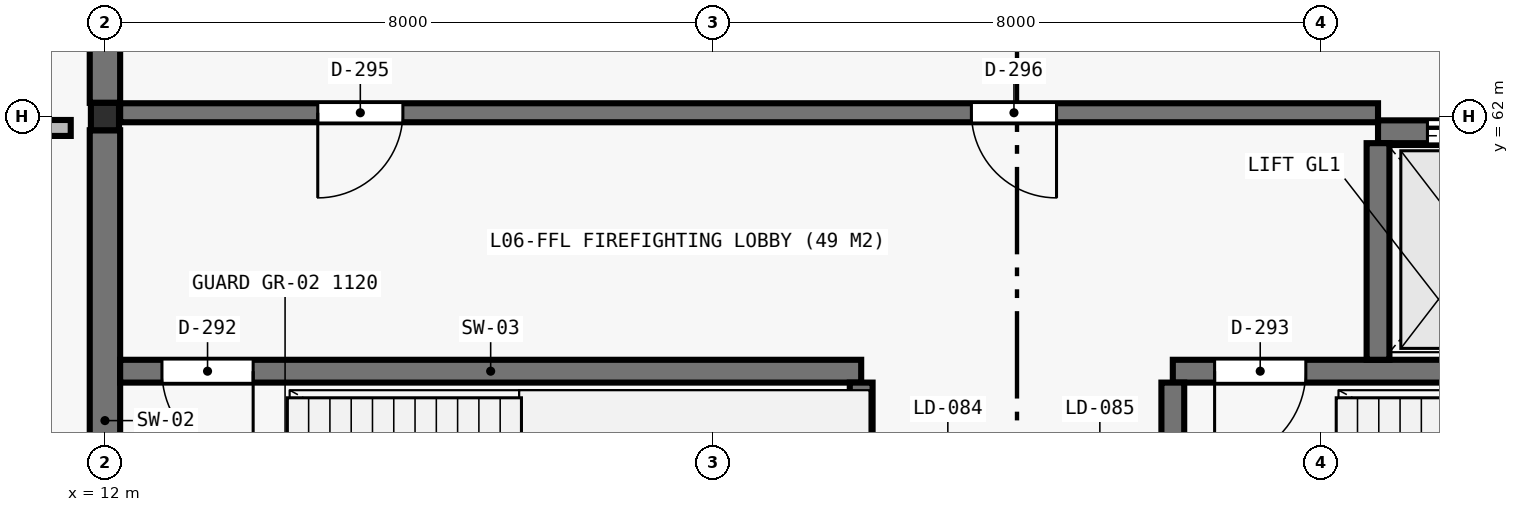
"""IFC4 building model, lengths in metres.
Left out: names, types, materials, properties, quantities, classifications, styles, units other than length and angle.
Written with IfcOpenShell. Run it as: python <this file> out.ifc"""

import sys

from ifc_helpers import new_model, si_unit, direction, frame, frame_2d, origin, origin_2d, place, context, subcontext, project, spatial, rectangle, i_section, extrude, element, fill, save


model = new_model("IFC4")
c1 = context("Model", 3, precision=1e-05, world=origin(), true_north=direction((0.0, 1.0)))
c2 = subcontext(c1, "Body", "Model", "MODEL_VIEW")
j1 = project(units=[si_unit("LENGTHUNIT", "METRE"), si_unit("PLANEANGLEUNIT", "RADIAN")], contexts=[c1])
p1 = place(None, origin())
s1 = spatial("IfcSite", under=j1, at=p1, CompositionType="ELEMENT")
p2 = place(p1, origin())
s2 = spatial("IfcBuilding", under=s1, at=p2, CompositionType="ELEMENT")
p3 = place(p2, frame((0.0, 0.0, 28.0)))
s3 = spatial("IfcBuildingStorey", under=s2, at=p3, CompositionType="ELEMENT", Elevation=28.0)
p4 = place(p3, frame((12.0, 62.0, 0.0), z_axis=(0.0, 0.0, 1.0), x_axis=(1.0, 0.0, 0.0)))
e1 = element("IfcColumn", 1, at=p4, inside=s3, PredefinedType="COLUMN", context=c2, shape_type="SweptSolid", body=[
    extrude(i_section(OverallWidth=0.37, OverallDepth=0.36, WebThickness=0.012, FlangeThickness=0.02, at=origin_2d()), origin(), (0.0, 0.0, 1.0), 3.98),
])
p5 = place(p3, frame((12.0, 54.18, 0.0), z_axis=(0.0, 0.0, 1.0), x_axis=(0.0, 1.0, 0.0)))
e2 = element("IfcWall", 2, at=p5, inside=s3, PredefinedType="SHEAR", context=c2, shape_type="SweptSolid", body=[
    extrude(rectangle(XDim=7.64, YDim=0.4, at=frame_2d((3.82, 0.0))), origin(), (0.0, 0.0, 1.0), 3.98),
])
p6 = place(p3, frame((12.0, 62.18, 0.0), z_axis=(0.0, 0.0, 1.0), x_axis=(0.0, 1.0, 0.0)))
e3 = element("IfcWall", 3, at=p6, inside=s3, PredefinedType="SHEAR", context=c2, shape_type="SweptSolid", body=[
    extrude(rectangle(XDim=7.64, YDim=0.4, at=frame_2d((3.82, 0.0))), origin(), (0.0, 0.0, 1.0), 3.98),
])
p7 = place(p6, frame((0.72, 0.0, 0.0)))
e4 = element("IfcOpeningElement", 4, at=p7, cuts=e3, PredefinedType="OPENING", context=c2, shape_type="SweptSolid", body=[
    extrude(rectangle(XDim=1.8, YDim=2.2, at=frame_2d((0.9, 1.1))), frame((0.0, 0.21, 0.0), z_axis=(0.0, -1.0, 0.0), x_axis=(1.0, 0.0, 0.0)), (0.0, 0.0, 1.0), 0.42),
])
p8 = place(p3, frame((12.2, 58.65, 0.0), z_axis=(0.0, 0.0, 1.0), x_axis=(1.0, 0.0, 0.0)))
e5 = element("IfcWall", 5, at=p8, inside=s3, PredefinedType="SHEAR", context=c2, shape_type="SweptSolid", body=[
    extrude(rectangle(XDim=9.75, YDim=0.3, at=frame_2d((4.875, 0.0))), origin(), (0.0, 0.0, 1.0), 3.98),
])
p9 = place(p8, frame((0.55, 0.0, 0.0)))
e6 = element("IfcOpeningElement", 6, at=p9, cuts=e5, PredefinedType="OPENING", context=c2, shape_type="SweptSolid", body=[
    extrude(rectangle(XDim=1.2, YDim=2.2, at=frame_2d((0.6, 1.1))), frame((0.0, 0.16, 0.0), z_axis=(0.0, -1.0, 0.0), x_axis=(1.0, 0.0, 0.0)), (0.0, 0.0, 1.0), 0.32),
])
p10 = place(p3, frame((21.95, 54.25, 0.0), z_axis=(0.0, 0.0, 1.0), x_axis=(0.0, 1.0, 0.0)))
e7 = element("IfcWall", 7, at=p10, inside=s3, PredefinedType="SHEAR", context=c2, shape_type="SweptSolid", body=[
    extrude(rectangle(XDim=4.25, YDim=0.3, at=frame_2d((2.125, 0.0))), origin(), (0.0, 0.0, 1.0), 3.98),
])
p11 = place(p3, frame((26.05, 58.65, 0.0), z_axis=(0.0, 0.0, 1.0), x_axis=(1.0, 0.0, 0.0)))
e8 = element("IfcWall", 8, at=p11, inside=s3, PredefinedType="SHEAR", context=c2, shape_type="SweptSolid", body=[
    extrude(rectangle(XDim=9.75, YDim=0.3, at=frame_2d((4.875, 0.0))), origin(), (0.0, 0.0, 1.0), 3.98),
])
p12 = place(p11, frame((0.55, 0.0, 0.0)))
e9 = element("IfcOpeningElement", 9, at=p12, cuts=e8, PredefinedType="OPENING", context=c2, shape_type="SweptSolid", body=[
    extrude(rectangle(XDim=1.2, YDim=2.2, at=frame_2d((0.6, 1.1))), frame((0.0, 0.16, 0.0), z_axis=(0.0, -1.0, 0.0), x_axis=(1.0, 0.0, 0.0)), (0.0, 0.0, 1.0), 0.32),
])
p13 = place(p3, frame((26.05, 54.25, 0.0), z_axis=(0.0, 0.0, 1.0), x_axis=(0.0, 1.0, 0.0)))
e10 = element("IfcWall", 10, at=p13, inside=s3, PredefinedType="SHEAR", context=c2, shape_type="SweptSolid", body=[
    extrude(rectangle(XDim=4.25, YDim=0.3, at=frame_2d((2.125, 0.0))), origin(), (0.0, 0.0, 1.0), 3.98),
])
p14 = place(p3, frame((28.75, 61.8, 0.0), z_axis=(0.0, 0.0, 1.0), x_axis=(1.0, 0.0, 0.0)))
e11 = element("IfcWall", 11, at=p14, inside=s3, PredefinedType="SHEAR", context=c2, shape_type="SweptSolid", body=[
    extrude(rectangle(XDim=5.0, YDim=0.3, at=frame_2d((2.5, 0.0))), origin(), (0.0, 0.0, 1.0), 3.98),
])
p15 = place(p14, frame((0.65, 0.0, 0.0)))
e12 = element("IfcOpeningElement", 12, at=p15, cuts=e11, PredefinedType="OPENING", context=c2, shape_type="SweptSolid", body=[
    extrude(rectangle(XDim=1.3, YDim=2.3, at=frame_2d((0.65, 1.15))), frame((0.0, 0.16, 0.0), z_axis=(0.0, -1.0, 0.0), x_axis=(1.0, 0.0, 0.0)), (0.0, 0.0, 1.0), 0.32),
])
p16 = place(p14, frame((3.1, 0.0, 0.0)))
e13 = element("IfcOpeningElement", 13, at=p16, cuts=e11, PredefinedType="OPENING", context=c2, shape_type="SweptSolid", body=[
    extrude(rectangle(XDim=1.08, YDim=2.2, at=frame_2d((0.54, 1.1))), frame((0.0, 0.16, 0.0), z_axis=(0.0, -1.0, 0.0), x_axis=(1.0, 0.0, 0.0)), (0.0, 0.0, 1.0), 0.32),
])
p17 = place(p3, frame((28.75, 58.8, 0.0), z_axis=(0.0, 0.0, 1.0), x_axis=(0.0, 1.0, 0.0)))
e14 = element("IfcWall", 14, at=p17, inside=s3, PredefinedType="SHEAR", context=c2, shape_type="SweptSolid", body=[
    extrude(rectangle(XDim=2.85, YDim=0.3, at=frame_2d((1.425, 0.0))), origin(), (0.0, 0.0, 1.0), 3.98),
])
p18 = place(p3, frame((12.2, 62.05, 0.0), z_axis=(0.0, 0.0, 1.0), x_axis=(1.0, 0.0, 0.0)))
e15 = element("IfcWall", 15, at=p18, inside=s3, PredefinedType="SHEAR", context=c2, shape_type="SweptSolid", body=[
    extrude(rectangle(XDim=16.55, YDim=0.25, at=frame_2d((8.275, 0.0))), origin(), (0.0, 0.0, 1.0), 3.98),
])
p19 = place(p18, frame((2.6, 0.0, 0.0)))
e16 = element("IfcOpeningElement", 16, at=p19, cuts=e15, PredefinedType="OPENING", context=c2, shape_type="SweptSolid", body=[
    extrude(rectangle(XDim=1.12, YDim=2.22, at=frame_2d((0.56, 1.11))), frame((0.0, 0.135, 0.0), z_axis=(0.0, -1.0, 0.0), x_axis=(1.0, 0.0, 0.0)), (0.0, 0.0, 1.0), 0.27),
])
p20 = place(p18, frame((11.2, 0.0, 0.0)))
e17 = element("IfcOpeningElement", 17, at=p20, cuts=e15, PredefinedType="OPENING", context=c2, shape_type="SweptSolid", body=[
    extrude(rectangle(XDim=1.12, YDim=2.22, at=frame_2d((0.56, 1.11))), frame((0.0, 0.135, 0.0), z_axis=(0.0, -1.0, 0.0), x_axis=(1.0, 0.0, 0.0)), (0.0, 0.0, 1.0), 0.27),
])
p21 = place(p3, frame((6.35, 61.85, 0.0), z_axis=(0.0, 0.0, 1.0), x_axis=(1.0, 0.0, 0.0)))
e18 = element("IfcWall", 18, at=p21, inside=s3, PredefinedType="PLUMBINGWALL", context=c2, shape_type="SweptSolid", body=[
    extrude(rectangle(XDim=5.2, YDim=0.21, at=frame_2d((2.6, 0.0))), origin(), (0.0, 0.0, 1.0), 3.98),
])
p22 = place(p21, frame((0.35, 0.0, 0.0)))
e19 = element("IfcOpeningElement", 19, at=p22, cuts=e18, PredefinedType="OPENING", context=c2, shape_type="SweptSolid", body=[
    extrude(rectangle(XDim=0.95, YDim=2.1, at=frame_2d((0.475, 1.05))), frame((0.0, 0.115, 0.0), z_axis=(0.0, -1.0, 0.0), x_axis=(1.0, 0.0, 0.0)), (0.0, 0.0, 1.0), 0.23),
])
p23 = place(p21, frame((2.1, 0.0, 0.0)))
e20 = element("IfcOpeningElement", 20, at=p23, cuts=e18, PredefinedType="OPENING", context=c2, shape_type="SweptSolid", body=[
    extrude(rectangle(XDim=0.9, YDim=2.1, at=frame_2d((0.45, 1.05))), frame((0.0, 0.115, 0.0), z_axis=(0.0, -1.0, 0.0), x_axis=(1.0, 0.0, 0.0)), (0.0, 0.0, 1.0), 0.23),
])
p24 = place(p21, frame((3.8, 0.0, 0.0)))
e21 = element("IfcOpeningElement", 21, at=p24, cuts=e18, PredefinedType="OPENING", context=c2, shape_type="SweptSolid", body=[
    extrude(rectangle(XDim=0.9, YDim=2.1, at=frame_2d((0.45, 1.05))), frame((0.0, 0.115, 0.0), z_axis=(0.0, -1.0, 0.0), x_axis=(1.0, 0.0, 0.0)), (0.0, 0.0, 1.0), 0.23),
])
p25 = place(p9, frame((1.2, 0.0, 0.0), z_axis=(0.0, 0.0, 1.0), x_axis=(-1.0, 0.0, 0.0)))
e22 = element("IfcDoor", 22, at=p25, inside=s3, OperationType="SINGLE_SWING_LEFT", PredefinedType="DOOR", context=c2, shape_type="SweptSolid", body=[
    extrude(rectangle(XDim=1.2, YDim=2.2, at=frame_2d((0.6, 1.1))), frame((0.0, 0.025, 0.0), z_axis=(0.0, -1.0, 0.0), x_axis=(1.0, 0.0, 0.0)), (0.0, 0.0, 1.0), 0.05),
])
fill(e6, e22)
p26 = place(p12, frame((1.2, 0.0, 0.0), z_axis=(0.0, 0.0, 1.0), x_axis=(-1.0, 0.0, 0.0)))
e23 = element("IfcDoor", 23, at=p26, inside=s3, OperationType="SINGLE_SWING_RIGHT", PredefinedType="DOOR", context=c2, shape_type="SweptSolid", body=[
    extrude(rectangle(XDim=1.2, YDim=2.2, at=frame_2d((0.6, 1.1))), frame((0.0, 0.025, 0.0), z_axis=(0.0, -1.0, 0.0), x_axis=(1.0, 0.0, 0.0)), (0.0, 0.0, 1.0), 0.05),
])
fill(e9, e23)
p27 = place(p15, origin())
e24 = element("IfcDoor", 24, at=p27, inside=s3, OperationType="SLIDING_TO_LEFT", PredefinedType="DOOR", context=c2, shape_type="SweptSolid", body=[
    extrude(rectangle(XDim=1.3, YDim=2.3, at=frame_2d((0.65, 1.15))), frame((0.0, 0.025, 0.0), z_axis=(0.0, -1.0, 0.0), x_axis=(1.0, 0.0, 0.0)), (0.0, 0.0, 1.0), 0.05),
])
fill(e12, e24)
p28 = place(p19, frame((1.12, 0.0, 0.0), z_axis=(0.0, 0.0, 1.0), x_axis=(-1.0, 0.0, 0.0)))
e25 = element("IfcDoor", 25, at=p28, inside=s3, OperationType="SINGLE_SWING_RIGHT", PredefinedType="DOOR", context=c2, shape_type="SweptSolid", body=[
    extrude(rectangle(XDim=1.12, YDim=2.22, at=frame_2d((0.56, 1.11))), frame((0.0, 0.025, 0.0), z_axis=(0.0, -1.0, 0.0), x_axis=(1.0, 0.0, 0.0)), (0.0, 0.0, 1.0), 0.05),
])
fill(e16, e25)
p29 = place(p20, frame((1.12, 0.0, 0.0), z_axis=(0.0, 0.0, 1.0), x_axis=(-1.0, 0.0, 0.0)))
e26 = element("IfcDoor", 26, at=p29, inside=s3, OperationType="SINGLE_SWING_LEFT", PredefinedType="DOOR", context=c2, shape_type="SweptSolid", body=[
    extrude(rectangle(XDim=1.12, YDim=2.22, at=frame_2d((0.56, 1.11))), frame((0.0, 0.025, 0.0), z_axis=(0.0, -1.0, 0.0), x_axis=(1.0, 0.0, 0.0)), (0.0, 0.0, 1.0), 0.05),
])
fill(e17, e26)
save(model, sys.argv[1])
